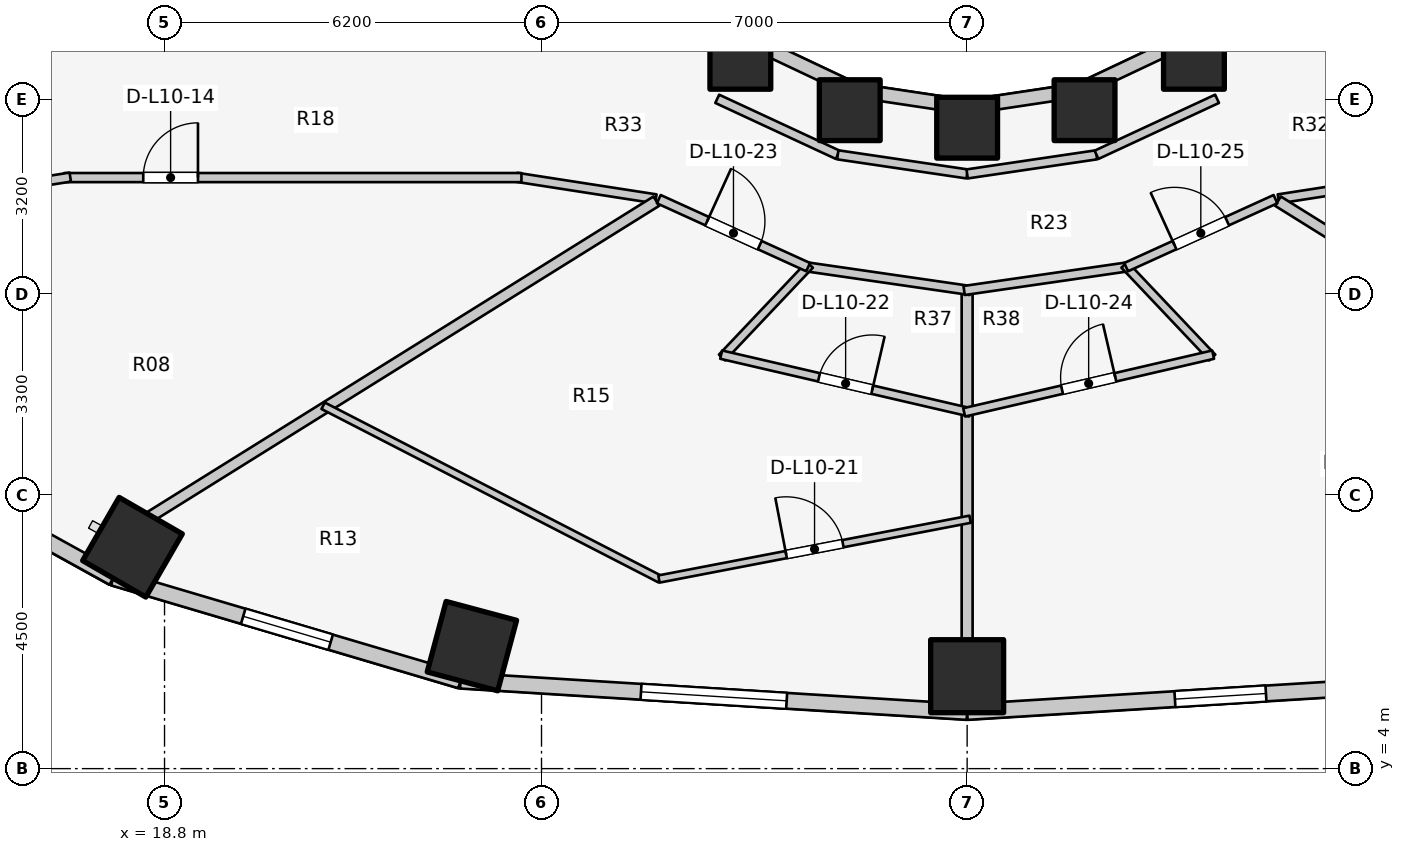
"""IFC4 building model, lengths in metres.
Left out: names, types, materials, properties, quantities, classifications, styles, units other than length and angle.
Written with IfcOpenShell. Run it as: python <this file> out.ifc"""

import sys

from ifc_helpers import new_model, si_unit, direction, frame, frame_2d, origin, origin_2d, place, context, subcontext, project, spatial, rectangle, extrude, element, fill, save


model = new_model("IFC4")
c1 = context("Model", 3, precision=1e-05, world=origin(), true_north=direction((0.0, 1.0)))
c2 = subcontext(c1, "Body", "Model", "MODEL_VIEW")
j1 = project(units=[si_unit("LENGTHUNIT", "METRE"), si_unit("PLANEANGLEUNIT", "RADIAN")], contexts=[c1])
p1 = place(None, origin())
s1 = spatial("IfcSite", under=j1, at=p1, CompositionType="ELEMENT")
p2 = place(p1, origin())
s2 = spatial("IfcBuilding", under=s1, at=p2, CompositionType="ELEMENT")
p3 = place(p2, frame((0.0, 0.0, 36.9)))
s3 = spatial("IfcBuildingStorey", under=s2, at=p3, CompositionType="ELEMENT", Elevation=36.9)
p4 = place(p3, frame((28.27, 15.673, 0.0), z_axis=(0.0, 0.0, 1.0), x_axis=(1.0, 0.0, 0.0)))
e1 = element("IfcColumn", 1, at=p4, inside=s3, PredefinedType="COLUMN", context=c2, shape_type="SweptSolid", body=[
    extrude(rectangle(XDim=1.0, YDim=1.0, at=origin_2d()), origin(), (0.0, 0.0, 1.0), 3.1),
])
p5 = place(p3, frame((18.273, 7.641, 0.0), z_axis=(0.0, 0.0, 1.0), x_axis=(-0.5, -0.866025403784, 0.0)))
e2 = element("IfcColumn", 2, at=p5, inside=s3, PredefinedType="COLUMN", context=c2, shape_type="SweptSolid", body=[
    extrude(rectangle(XDim=1.2, YDim=1.2, at=origin_2d()), origin(), (0.0, 0.0, 1.0), 3.1),
])
p6 = place(p3, frame((30.069, 14.828, 0.0), z_axis=(0.0, 0.0, 1.0), x_axis=(1.0, 0.0, 0.0)))
e3 = element("IfcColumn", 3, at=p6, inside=s3, PredefinedType="COLUMN", context=c2, shape_type="SweptSolid", body=[
    extrude(rectangle(XDim=1.0, YDim=1.0, at=origin_2d()), origin(), (0.0, 0.0, 1.0), 3.1),
])
p7 = place(p3, frame((23.855, 6.014, 0.0), z_axis=(0.0, 0.0, 1.0), x_axis=(-0.258819045103, -0.965925826289, 0.0)))
e4 = element("IfcColumn", 4, at=p7, inside=s3, PredefinedType="COLUMN", context=c2, shape_type="SweptSolid", body=[
    extrude(rectangle(XDim=1.2, YDim=1.2, at=origin_2d()), origin(), (0.0, 0.0, 1.0), 3.1),
])
p8 = place(p3, frame((32.0, 14.54, 0.0), z_axis=(0.0, 0.0, 1.0), x_axis=(1.0, 0.0, 0.0)))
e5 = element("IfcColumn", 5, at=p8, inside=s3, PredefinedType="COLUMN", context=c2, shape_type="SweptSolid", body=[
    extrude(rectangle(XDim=1.0, YDim=1.0, at=origin_2d()), origin(), (0.0, 0.0, 1.0), 3.1),
])
p9 = place(p3, frame((32.0, 5.52, 0.0), z_axis=(0.0, 0.0, 1.0), x_axis=(0.0, -1.0, 0.0)))
e6 = element("IfcColumn", 6, at=p9, inside=s3, PredefinedType="COLUMN", context=c2, shape_type="SweptSolid", body=[
    extrude(rectangle(XDim=1.2, YDim=1.2, at=origin_2d()), origin(), (0.0, 0.0, 1.0), 3.1),
])
for number, where, z_axis, x_axis in (
    (7, (33.931, 14.828, 0.0), (0.0, 0.0, 1.0), (1.0, 0.0, 0.0)),
    (8, (35.73, 15.673, 0.0), (0.0, 0.0, 1.0), (1.0, 0.0, 0.0)),
):
    element("IfcColumn", number, at=place(p3, frame(where, z_axis=z_axis, x_axis=x_axis)), inside=s3, PredefinedType="COLUMN", context=c2, shape_type="SweptSolid", body=[
        extrude(rectangle(XDim=1.0, YDim=1.0, at=origin_2d()), origin(), (0.0, 0.0, 1.0), 3.1),
    ])
p10 = place(p3, frame((28.44, 15.968, 0.0), z_axis=(0.0, 0.0, 1.0), x_axis=(0.904179699603, -0.427152280606, 0.0)))
e9 = element("IfcWall", 9, at=p10, inside=s3, PredefinedType="STANDARD", context=c2, shape_type="SweptSolid", body=[
    extrude(rectangle(XDim=1.899, YDim=0.23, at=frame_2d((0.95, 0.0))), origin(), (0.0, 0.0, 1.0), 2.16),
])
for number, where, z_axis, x_axis in (
    (10, (30.157, 15.157, 0.0), (0.0, 0.0, 1.0), (0.989, -0.149, 0.0)),
    (11, (32.0, 14.88, 0.0), (0.0, 0.0, 1.0), (0.989, 0.149, 0.0)),
):
    element("IfcWall", number, at=place(p3, frame(where, z_axis=z_axis, x_axis=x_axis)), inside=s3, PredefinedType="STANDARD", context=c2, shape_type="SweptSolid", body=[
        extrude(rectangle(XDim=1.864, YDim=0.23, at=frame_2d((0.932, 0.0))), origin(), (0.0, 0.0, 1.0), 2.16),
    ])
p11 = place(p3, frame((33.843, 15.157, 0.0), z_axis=(0.0, 0.0, 1.0), x_axis=(0.904179699603, 0.427152280606, 0.0)))
e12 = element("IfcWall", 12, at=p11, inside=s3, PredefinedType="STANDARD", context=c2, shape_type="SweptSolid", body=[
    extrude(rectangle(XDim=1.899, YDim=0.23, at=frame_2d((0.95, 0.0))), origin(), (0.0, 0.0, 1.0), 2.16),
])
p12 = place(p3, frame((13.595, 9.55, 0.0), z_axis=(0.0, 0.0, 1.0), x_axis=(0.875137303239, -0.483874674352, 0.0)))
e13 = element("IfcWall", 13, at=p12, inside=s3, PredefinedType="STANDARD", context=c2, shape_type="SweptSolid", body=[
    extrude(rectangle(XDim=4.985, YDim=0.26, at=frame_2d((2.493, 0.0))), origin(), (0.0, 0.0, 1.0), 2.85),
])
p13 = place(p3, frame((17.958, 7.138, 0.0), z_axis=(0.0, 0.0, 1.0), x_axis=(0.958843593522, -0.283934786811, 0.0)))
e14 = element("IfcWall", 14, at=p13, inside=s3, PredefinedType="STANDARD", context=c2, shape_type="SweptSolid", body=[
    extrude(rectangle(XDim=5.955, YDim=0.26, at=frame_2d((2.978, 0.0))), origin(), (0.0, 0.0, 1.0), 2.85),
])
p14 = place(p13, frame((2.228, 0.0, 0.75)))
e15 = element("IfcOpeningElement", 15, at=p14, cuts=e14, PredefinedType="OPENING", context=c2, shape_type="SweptSolid", body=[
    extrude(rectangle(XDim=1.5, YDim=1.6, at=frame_2d((0.75, 0.8))), frame((0.0, 0.14, 0.0), z_axis=(0.0, -1.0, 0.0), x_axis=(1.0, 0.0, 0.0)), (0.0, 0.0, 1.0), 0.28),
])
p15 = place(p3, frame((23.668, 5.447, 0.0), z_axis=(0.0, 0.0, 1.0), x_axis=(0.998090514779, -0.061768311519, 0.0)))
e16 = element("IfcWall", 16, at=p15, inside=s3, PredefinedType="STANDARD", context=c2, shape_type="SweptSolid", body=[
    extrude(rectangle(XDim=8.348, YDim=0.26, at=frame_2d((4.174, 0.0))), origin(), (0.0, 0.0, 1.0), 2.85),
])
p16 = place(p15, frame((2.974, 0.0, 0.75)))
e17 = element("IfcOpeningElement", 17, at=p16, cuts=e16, PredefinedType="OPENING", context=c2, shape_type="SweptSolid", body=[
    extrude(rectangle(XDim=2.4, YDim=1.7, at=frame_2d((1.2, 0.85))), frame((0.0, 0.14, 0.0), z_axis=(0.0, -1.0, 0.0), x_axis=(1.0, 0.0, 0.0)), (0.0, 0.0, 1.0), 0.28),
])
p17 = place(p3, frame((32.0, 4.931, 0.0), z_axis=(0.0, 0.0, 1.0), x_axis=(0.998090514779, 0.061768311519, 0.0)))
e18 = element("IfcWall", 18, at=p17, inside=s3, PredefinedType="STANDARD", context=c2, shape_type="SweptSolid", body=[
    extrude(rectangle(XDim=8.348, YDim=0.26, at=frame_2d((4.174, 0.0))), origin(), (0.0, 0.0, 1.0), 2.85),
])
p18 = place(p17, frame((3.424, 0.0, 0.75)))
e19 = element("IfcOpeningElement", 19, at=p18, cuts=e18, PredefinedType="OPENING", context=c2, shape_type="SweptSolid", body=[
    extrude(rectangle(XDim=1.5, YDim=1.6, at=frame_2d((0.75, 0.8))), frame((0.0, 0.14, 0.0), z_axis=(0.0, -1.0, 0.0), x_axis=(1.0, 0.0, 0.0)), (0.0, 0.0, 1.0), 0.28),
])
p19 = place(p3, frame((27.89, 15.015, 0.0), z_axis=(0.0, 0.0, 1.0), x_axis=(0.906943449489, -0.421252393975, 0.0)))
e20 = element("IfcWall", 20, at=p19, inside=s3, PredefinedType="PARTITIONING", context=c2, shape_type="SweptSolid", body=[
    extrude(rectangle(XDim=2.186, YDim=0.15, at=frame_2d((1.093, 0.0))), origin(), (0.0, 0.0, 1.0), 2.237),
])
for number, where, z_axis, x_axis in (
    (21, (29.873, 14.094, 0.0), (0.0, 0.0, 1.0), (0.989, -0.146, 0.0)),
    (22, (32.0, 13.78, 0.0), (0.0, 0.0, 1.0), (0.989, 0.146, 0.0)),
):
    element("IfcWall", number, at=place(p3, frame(where, z_axis=z_axis, x_axis=x_axis)), inside=s3, PredefinedType="PARTITIONING", context=c2, shape_type="SweptSolid", body=[
        extrude(rectangle(XDim=2.151, YDim=0.15, at=frame_2d((1.075, 0.0))), origin(), (0.0, 0.0, 1.0), 2.237),
    ])
p20 = place(p3, frame((34.127, 14.094, 0.0), z_axis=(0.0, 0.0, 1.0), x_axis=(0.906943449489, 0.421252393975, 0.0)))
e23 = element("IfcWall", 23, at=p20, inside=s3, PredefinedType="PARTITIONING", context=c2, shape_type="SweptSolid", body=[
    extrude(rectangle(XDim=2.186, YDim=0.15, at=frame_2d((1.093, 0.0))), origin(), (0.0, 0.0, 1.0), 2.237),
])
p21 = place(p3, frame((26.881, 13.369, 0.0), z_axis=(0.0, 0.0, 1.0), x_axis=(-0.988184633586, 0.153268163508, 0.0)))
e24 = element("IfcWall", 24, at=p21, inside=s3, PredefinedType="PARTITIONING", context=c2, shape_type="SweptSolid", body=[
    extrude(rectangle(XDim=2.318, YDim=0.15, at=frame_2d((1.159, 0.0))), origin(), (0.0, 0.0, 1.0), 2.237),
])
p22 = place(p3, frame((17.15, 13.72, 0.0), z_axis=(0.0, 0.0, 1.0), x_axis=(1.0, 0.0, 0.0)))
e25 = element("IfcWall", 25, at=p22, inside=s3, PredefinedType="PARTITIONING", context=c2, shape_type="SweptSolid", body=[
    extrude(rectangle(XDim=7.52, YDim=0.15, at=frame_2d((3.76, 0.0))), origin(), (0.0, 0.0, 1.0), 2.237),
])
p23 = place(p22, frame((1.3, 0.0, 0.0)))
e26 = element("IfcOpeningElement", 26, at=p23, cuts=e25, PredefinedType="OPENING", context=c2, shape_type="SweptSolid", body=[
    extrude(rectangle(XDim=0.9, YDim=2.1, at=frame_2d((0.45, 1.05))), frame((0.0, 0.085, 0.0), z_axis=(0.0, -1.0, 0.0), x_axis=(1.0, 0.0, 0.0)), (0.0, 0.0, 1.0), 0.17),
])
p24 = place(p3, frame((17.25, 13.728, 0.0), z_axis=(0.0, 0.0, 1.0), x_axis=(-0.987655781226, -0.156639898525, 0.0)))
e27 = element("IfcWall", 27, at=p24, inside=s3, PredefinedType="PARTITIONING", context=c2, shape_type="SweptSolid", body=[
    extrude(rectangle(XDim=7.552, YDim=0.15, at=frame_2d((3.776, 0.0))), origin(), (0.0, 0.0, 1.0), 2.069),
])
p25 = place(p3, frame((37.119, 13.369, 0.0), z_axis=(0.0, 0.0, 1.0), x_axis=(0.988184633586, 0.153268163508, 0.0)))
e28 = element("IfcWall", 28, at=p25, inside=s3, PredefinedType="PARTITIONING", context=c2, shape_type="SweptSolid", body=[
    extrude(rectangle(XDim=2.318, YDim=0.15, at=frame_2d((1.159, 0.0))), origin(), (0.0, 0.0, 1.0), 2.237),
])
p26 = place(p3, frame((26.888, 13.332, 0.0), z_axis=(0.0, 0.0, 1.0), x_axis=(-0.848647785721, -0.52895834977, 0.0)))
e29 = element("IfcWall", 29, at=p26, inside=s3, PredefinedType="PARTITIONING", context=c2, shape_type="SweptSolid", body=[
    extrude(rectangle(XDim=9.81, YDim=0.18, at=frame_2d((4.905, 0.0))), origin(), (0.0, 0.0, 1.0), 2.237),
])
p27 = place(p3, frame((32.0, 11.815, 0.0), z_axis=(0.0, 0.0, 1.0), x_axis=(0.0, -1.0, 0.0)))
e30 = element("IfcWall", 30, at=p27, inside=s3, PredefinedType="PARTITIONING", context=c2, shape_type="SweptSolid", body=[
    extrude(rectangle(XDim=5.715, YDim=0.18, at=frame_2d((2.857, 0.0))), origin(), (0.0, 0.0, 1.0), 2.237),
])
p28 = place(p3, frame((37.112, 13.332, 0.0), z_axis=(0.0, 0.0, 1.0), x_axis=(0.848647785721, -0.52895834977, 0.0)))
e31 = element("IfcWall", 31, at=p28, inside=s3, PredefinedType="PARTITIONING", context=c2, shape_type="SweptSolid", body=[
    extrude(rectangle(XDim=9.81, YDim=0.18, at=frame_2d((4.905, 0.0))), origin(), (0.0, 0.0, 1.0), 2.237),
])
p29 = place(p3, frame((21.409, 9.967, 0.0), z_axis=(0.0, 0.0, 1.0), x_axis=(0.889172609005, -0.457571930296, 0.0)))
e32 = element("IfcWall", 32, at=p29, inside=s3, PredefinedType="MOVABLE", context=c2, shape_type="SweptSolid", body=[
    extrude(rectangle(XDim=6.232, YDim=0.12, at=frame_2d((3.116, 0.0))), origin(), (0.0, 0.0, 1.0), 2.237),
])
p30 = place(p3, frame((26.932, 7.118, 0.0), z_axis=(0.0, 0.0, 1.0), x_axis=(0.982039182538, 0.188677089126, 0.0)))
e33 = element("IfcWall", 33, at=p30, inside=s3, PredefinedType="MOVABLE", context=c2, shape_type="SweptSolid", body=[
    extrude(rectangle(XDim=5.211, YDim=0.12, at=frame_2d((2.605, 0.0))), origin(), (0.0, 0.0, 1.0), 2.237),
])
p31 = place(p30, frame((2.131, 0.0, 0.0)))
e34 = element("IfcOpeningElement", 34, at=p31, cuts=e33, PredefinedType="OPENING", context=c2, shape_type="SweptSolid", body=[
    extrude(rectangle(XDim=0.95, YDim=2.1, at=frame_2d((0.475, 1.05))), frame((0.0, 0.07, 0.0), z_axis=(0.0, -1.0, 0.0), x_axis=(1.0, 0.0, 0.0)), (0.0, 0.0, 1.0), 0.14),
])
p32 = place(p3, frame((29.329, 12.256, 0.0), z_axis=(0.0, 0.0, 1.0), x_axis=(0.989701115085, -0.143149232617, 0.0)))
e35 = element("IfcWall", 35, at=p32, inside=s3, PredefinedType="PARTITIONING", context=c2, shape_type="SweptSolid", body=[
    extrude(rectangle(XDim=2.749, YDim=0.15, at=frame_2d((1.375, 0.0))), origin(), (0.0, 0.0, 1.0), 2.237),
])
p33 = place(p3, frame((29.413, 12.285, 0.0), z_axis=(0.0, 0.0, 1.0), x_axis=(-0.687544693502, -0.72614206216, 0.0)))
e36 = element("IfcWall", 36, at=p33, inside=s3, PredefinedType="PLUMBINGWALL", context=c2, shape_type="SweptSolid", body=[
    extrude(rectangle(XDim=2.1, YDim=0.14, at=frame_2d((1.05, 0.0))), origin(), (0.0, 0.0, 1.0), 2.855),
])
p34 = place(p3, frame((27.954, 10.808, 0.0), z_axis=(0.0, 0.0, 1.0), x_axis=(0.974148813221, -0.225907259071, 0.0)))
e37 = element("IfcWall", 37, at=p34, inside=s3, PredefinedType="PLUMBINGWALL", context=c2, shape_type="SweptSolid", body=[
    extrude(rectangle(XDim=4.203, YDim=0.14, at=frame_2d((2.102, 0.0))), origin(), (0.0, 0.0, 1.0), 2.237),
])
p35 = place(p34, frame((1.652, 0.0, 0.0)))
e38 = element("IfcOpeningElement", 38, at=p35, cuts=e37, PredefinedType="OPENING", context=c2, shape_type="SweptSolid", body=[
    extrude(rectangle(XDim=0.9, YDim=2.1, at=frame_2d((0.45, 1.05))), frame((0.0, 0.08, 0.0), z_axis=(0.0, -1.0, 0.0), x_axis=(1.0, 0.0, 0.0)), (0.0, 0.0, 1.0), 0.16),
])
p36 = place(p3, frame((26.929, 13.365, 0.0), z_axis=(0.0, 0.0, 1.0), x_axis=(0.910186679378, -0.414198272186, 0.0)))
e39 = element("IfcWall", 39, at=p36, inside=s3, PredefinedType="PARTITIONING", context=c2, shape_type="SweptSolid", body=[
    extrude(rectangle(XDim=2.698, YDim=0.15, at=frame_2d((1.349, 0.0))), origin(), (0.0, 0.0, 1.0), 2.237),
])
p37 = place(p36, frame((0.874, 0.0, 0.0)))
e40 = element("IfcOpeningElement", 40, at=p37, cuts=e39, PredefinedType="OPENING", context=c2, shape_type="SweptSolid", body=[
    extrude(rectangle(XDim=0.95, YDim=2.1, at=frame_2d((0.475, 1.05))), frame((0.0, 0.085, 0.0), z_axis=(0.0, -1.0, 0.0), x_axis=(1.0, 0.0, 0.0)), (0.0, 0.0, 1.0), 0.17),
])
p38 = place(p3, frame((31.95, 11.863, 0.0), z_axis=(0.0, 0.0, 1.0), x_axis=(0.989701115085, 0.143149232617, 0.0)))
e41 = element("IfcWall", 41, at=p38, inside=s3, PredefinedType="PARTITIONING", context=c2, shape_type="SweptSolid", body=[
    extrude(rectangle(XDim=2.749, YDim=0.15, at=frame_2d((1.375, 0.0))), origin(), (0.0, 0.0, 1.0), 2.237),
])
p39 = place(p3, frame((34.587, 12.285, 0.0), z_axis=(0.0, 0.0, 1.0), x_axis=(0.687544693502, -0.72614206216, 0.0)))
e42 = element("IfcWall", 42, at=p39, inside=s3, PredefinedType="PLUMBINGWALL", context=c2, shape_type="SweptSolid", body=[
    extrude(rectangle(XDim=2.1, YDim=0.14, at=frame_2d((1.05, 0.0))), origin(), (0.0, 0.0, 1.0), 2.855),
])
p40 = place(p3, frame((31.951, 9.859, 0.0), z_axis=(0.0, 0.0, 1.0), x_axis=(0.974148813221, 0.225907259071, 0.0)))
e43 = element("IfcWall", 43, at=p40, inside=s3, PredefinedType="PLUMBINGWALL", context=c2, shape_type="SweptSolid", body=[
    extrude(rectangle(XDim=4.203, YDim=0.14, at=frame_2d((2.102, 0.0))), origin(), (0.0, 0.0, 1.0), 2.237),
])
p41 = place(p40, frame((1.652, 0.0, 0.0)))
e44 = element("IfcOpeningElement", 44, at=p41, cuts=e43, PredefinedType="OPENING", context=c2, shape_type="SweptSolid", body=[
    extrude(rectangle(XDim=0.9, YDim=2.1, at=frame_2d((0.45, 1.05))), frame((0.0, 0.08, 0.0), z_axis=(0.0, -1.0, 0.0), x_axis=(1.0, 0.0, 0.0)), (0.0, 0.0, 1.0), 0.16),
])
p42 = place(p3, frame((34.615, 12.247, 0.0), z_axis=(0.0, 0.0, 1.0), x_axis=(0.910186679378, 0.414198272186, 0.0)))
e45 = element("IfcWall", 45, at=p42, inside=s3, PredefinedType="PARTITIONING", context=c2, shape_type="SweptSolid", body=[
    extrude(rectangle(XDim=2.698, YDim=0.15, at=frame_2d((1.349, 0.0))), origin(), (0.0, 0.0, 1.0), 2.237),
])
p43 = place(p42, frame((0.874, 0.0, 0.0)))
e46 = element("IfcOpeningElement", 46, at=p43, cuts=e45, PredefinedType="OPENING", context=c2, shape_type="SweptSolid", body=[
    extrude(rectangle(XDim=0.95, YDim=2.1, at=frame_2d((0.475, 1.05))), frame((0.0, 0.085, 0.0), z_axis=(0.0, -1.0, 0.0), x_axis=(1.0, 0.0, 0.0)), (0.0, 0.0, 1.0), 0.17),
])
p44 = place(p14, origin())
e47 = element("IfcWindow", 47, at=p44, inside=s3, PartitioningType="SINGLE_PANEL", PredefinedType="WINDOW", context=c2, shape_type="SweptSolid", body=[
    extrude(rectangle(XDim=1.5, YDim=1.6, at=frame_2d((0.75, 0.8))), frame((0.0, 0.03, 0.0), z_axis=(0.0, -1.0, 0.0), x_axis=(1.0, 0.0, 0.0)), (0.0, 0.0, 1.0), 0.06),
])
fill(e15, e47)
p45 = place(p16, origin())
e48 = element("IfcWindow", 48, at=p45, inside=s3, PartitioningType="SINGLE_PANEL", PredefinedType="WINDOW", context=c2, shape_type="SweptSolid", body=[
    extrude(rectangle(XDim=2.4, YDim=1.7, at=frame_2d((1.2, 0.85))), frame((0.0, 0.03, 0.0), z_axis=(0.0, -1.0, 0.0), x_axis=(1.0, 0.0, 0.0)), (0.0, 0.0, 1.0), 0.06),
])
fill(e17, e48)
p46 = place(p18, origin())
e49 = element("IfcWindow", 49, at=p46, inside=s3, PartitioningType="SINGLE_PANEL", PredefinedType="WINDOW", context=c2, shape_type="SweptSolid", body=[
    extrude(rectangle(XDim=1.5, YDim=1.6, at=frame_2d((0.75, 0.8))), frame((0.0, 0.03, 0.0), z_axis=(0.0, -1.0, 0.0), x_axis=(1.0, 0.0, 0.0)), (0.0, 0.0, 1.0), 0.06),
])
fill(e19, e49)
p47 = place(p23, origin())
e50 = element("IfcDoor", 50, at=p47, inside=s3, OperationType="SINGLE_SWING_RIGHT", PredefinedType="DOOR", context=c2, shape_type="SweptSolid", body=[
    extrude(rectangle(XDim=0.9, YDim=2.1, at=frame_2d((0.45, 1.05))), frame((0.0, 0.025, 0.0), z_axis=(0.0, -1.0, 0.0), x_axis=(1.0, 0.0, 0.0)), (0.0, 0.0, 1.0), 0.05),
])
fill(e26, e50)
p48 = place(p31, origin())
e51 = element("IfcDoor", 51, at=p48, inside=s3, OperationType="SINGLE_SWING_LEFT", PredefinedType="DOOR", context=c2, shape_type="SweptSolid", body=[
    extrude(rectangle(XDim=0.95, YDim=2.1, at=frame_2d((0.475, 1.05))), frame((0.0, 0.025, 0.0), z_axis=(0.0, -1.0, 0.0), x_axis=(1.0, 0.0, 0.0)), (0.0, 0.0, 1.0), 0.05),
])
fill(e34, e51)
p49 = place(p35, origin())
e52 = element("IfcDoor", 52, at=p49, inside=s3, OperationType="SINGLE_SWING_RIGHT", PredefinedType="DOOR", context=c2, shape_type="SweptSolid", body=[
    extrude(rectangle(XDim=0.9, YDim=2.1, at=frame_2d((0.45, 1.05))), frame((0.0, 0.025, 0.0), z_axis=(0.0, -1.0, 0.0), x_axis=(1.0, 0.0, 0.0)), (0.0, 0.0, 1.0), 0.05),
])
fill(e38, e52)
p50 = place(p37, origin())
e53 = element("IfcDoor", 53, at=p50, inside=s3, OperationType="SINGLE_SWING_LEFT", PredefinedType="DOOR", context=c2, shape_type="SweptSolid", body=[
    extrude(rectangle(XDim=0.95, YDim=2.1, at=frame_2d((0.475, 1.05))), frame((0.0, 0.025, 0.0), z_axis=(0.0, -1.0, 0.0), x_axis=(1.0, 0.0, 0.0)), (0.0, 0.0, 1.0), 0.05),
])
fill(e40, e53)
p51 = place(p41, origin())
e54 = element("IfcDoor", 54, at=p51, inside=s3, OperationType="SINGLE_SWING_RIGHT", PredefinedType="DOOR", context=c2, shape_type="SweptSolid", body=[
    extrude(rectangle(XDim=0.9, YDim=2.1, at=frame_2d((0.45, 1.05))), frame((0.0, 0.025, 0.0), z_axis=(0.0, -1.0, 0.0), x_axis=(1.0, 0.0, 0.0)), (0.0, 0.0, 1.0), 0.05),
])
fill(e44, e54)
p52 = place(p43, origin())
e55 = element("IfcDoor", 55, at=p52, inside=s3, OperationType="SINGLE_SWING_LEFT", PredefinedType="DOOR", context=c2, shape_type="SweptSolid", body=[
    extrude(rectangle(XDim=0.95, YDim=2.1, at=frame_2d((0.475, 1.05))), frame((0.0, 0.025, 0.0), z_axis=(0.0, -1.0, 0.0), x_axis=(1.0, 0.0, 0.0)), (0.0, 0.0, 1.0), 0.05),
])
fill(e46, e55)
save(model, sys.argv[1])
